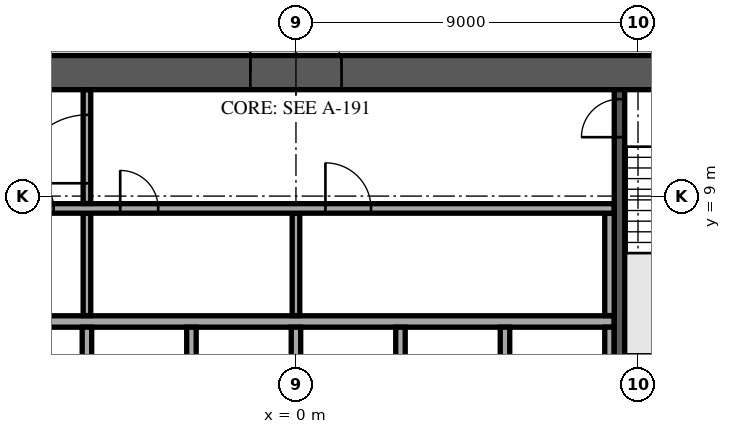
"""IFC4 building model, lengths in metres.
Left out: names, types, materials, properties, quantities, classifications, styles, units other than length and angle.
Written with IfcOpenShell. Run it as: python <this file> out.ifc"""

import sys

from ifc_helpers import new_model, si_unit, direction, frame, frame_2d, origin, place, context, subcontext, project, spatial, rectangle, extrude, element, fill, save


model = new_model("IFC4")
c1 = context("Model", 3, precision=1e-05, world=origin(), true_north=direction((0.0, 1.0)))
c2 = subcontext(c1, "Body", "Model", "MODEL_VIEW")
j1 = project(units=[si_unit("LENGTHUNIT", "METRE"), si_unit("PLANEANGLEUNIT", "RADIAN")], contexts=[c1])
p1 = place(None, origin())
s1 = spatial("IfcSite", under=j1, at=p1, CompositionType="ELEMENT")
p2 = place(p1, origin())
s2 = spatial("IfcBuilding", under=s1, at=p2, CompositionType="ELEMENT")
p3 = place(p2, frame((0.0, 0.0, 205.3)))
s3 = spatial("IfcBuildingStorey", under=s2, at=p3, CompositionType="ELEMENT", Elevation=205.3)
p4 = place(p3, frame((-12.7, 12.25, 0.0), z_axis=(0.0, 0.0, 1.0), x_axis=(1.0, 0.0, 0.0)))
e1 = element("IfcWall", 1, at=p4, inside=s3, PredefinedType="SHEAR", context=c2, shape_type="SweptSolid", body=[
    extrude(rectangle(XDim=25.4, YDim=0.9, at=frame_2d((12.7, 0.0))), origin(), (0.0, 0.0, 1.0), 3.62),
])
p5 = place(p4, frame((11.5, 0.0, 0.0)))
e2 = element("IfcOpeningElement", 2, at=p5, cuts=e1, PredefinedType="OPENING", context=c2, shape_type="SweptSolid", body=[
    extrude(rectangle(XDim=2.4, YDim=2.4, at=frame_2d((1.2, 1.2))), frame((0.0, 0.46, 0.0), z_axis=(0.0, -1.0, 0.0), x_axis=(1.0, 0.0, 0.0)), (0.0, 0.0, 1.0), 0.92),
])
p6 = place(p4, frame((22.325, 0.0, 0.0)))
e3 = element("IfcOpeningElement", 3, at=p6, cuts=e1, PredefinedType="OPENING", context=c2, shape_type="SweptSolid", body=[
    extrude(rectangle(XDim=1.2, YDim=2.1, at=frame_2d((0.6, 1.05))), frame((0.0, 0.46, 0.0), z_axis=(0.0, -1.0, 0.0), x_axis=(1.0, 0.0, 0.0)), (0.0, 0.0, 1.0), 0.92),
])
p7 = place(p4, frame((1.3, 0.0, 0.0)))
e4 = element("IfcOpeningElement", 4, at=p7, cuts=e1, PredefinedType="OPENING", context=c2, shape_type="SweptSolid", body=[
    extrude(rectangle(XDim=1.0, YDim=2.1, at=frame_2d((0.5, 1.05))), frame((0.0, 0.46, 0.0), z_axis=(0.0, -1.0, 0.0), x_axis=(1.0, 0.0, 0.0)), (0.0, 0.0, 1.0), 0.92),
])
p8 = place(p3, frame((-8.375, 5.7, 0.0), z_axis=(0.0, 0.0, 1.0), x_axis=(1.0, 0.0, 0.0)))
e5 = element("IfcWall", 5, at=p8, inside=s3, PredefinedType="SOLIDWALL", context=c2, shape_type="SweptSolid", body=[
    extrude(rectangle(XDim=16.75, YDim=0.3, at=frame_2d((8.375, 0.0))), origin(), (0.0, 0.0, 1.0), 3.62),
])
for number, where, z_axis, x_axis in (
    (6, (-5.5, 2.85, 0.0), (0.0, 0.0, 1.0), (0.0, 1.0, 0.0)),
    (7, (-2.75, 2.85, 0.0), (0.0, 0.0, 1.0), (0.0, 1.0, 0.0)),
    (8, (0.0, 2.85, 0.0), (0.0, 0.0, 1.0), (0.0, 1.0, 0.0)),
    (9, (2.75, 2.85, 0.0), (0.0, 0.0, 1.0), (0.0, 1.0, 0.0)),
    (10, (5.5, 2.85, 0.0), (0.0, 0.0, 1.0), (0.0, 1.0, 0.0)),
    (11, (8.25, 2.85, 0.0), (0.0, 0.0, 1.0), (0.0, 1.0, 0.0)),
):
    element("IfcWall", number, at=place(p3, frame(where, z_axis=z_axis, x_axis=x_axis)), inside=s3, PredefinedType="SOLIDWALL", context=c2, shape_type="SweptSolid", body=[
        extrude(rectangle(XDim=2.7, YDim=0.25, at=frame_2d((1.35, 0.0))), origin(), (0.0, 0.0, 1.0), 3.62),
    ])
p9 = place(p3, frame((8.512, 4.55, 0.0), z_axis=(0.0, 0.0, 1.0), x_axis=(0.0, 1.0, 0.0)))
e12 = element("IfcWall", 12, at=p9, inside=s3, PredefinedType="SOLIDWALL", context=c2, shape_type="SweptSolid", body=[
    extrude(rectangle(XDim=7.25, YDim=0.275, at=frame_2d((3.625, 0.0))), origin(), (0.0, 0.0, 1.0), 3.62),
])
p10 = place(p9, frame((6.0, 0.0, 0.0)))
e13 = element("IfcOpeningElement", 13, at=p10, cuts=e12, PredefinedType="OPENING", context=c2, shape_type="SweptSolid", body=[
    extrude(rectangle(XDim=1.0, YDim=2.1, at=frame_2d((0.5, 1.05))), frame((0.0, 0.147, 0.0), z_axis=(0.0, -1.0, 0.0), x_axis=(1.0, 0.0, 0.0)), (0.0, 0.0, 1.0), 0.295),
])
for number, where, z_axis, x_axis in (
    (14, (-5.5, 5.855, 0.0), (0.0, 0.0, 1.0), (0.0, 1.0, 0.0)),
    (15, (0.0, 5.855, 0.0), (0.0, 0.0, 1.0), (0.0, 1.0, 0.0)),
):
    element("IfcWall", number, at=place(p3, frame(where, z_axis=z_axis, x_axis=x_axis)), inside=s3, PredefinedType="PARTITIONING", context=c2, shape_type="SweptSolid", body=[
        extrude(rectangle(XDim=2.69, YDim=0.2, at=frame_2d((1.345, 0.0))), origin(), (0.0, 0.0, 1.0), 3.62),
    ])
p11 = place(p3, frame((8.25, 5.855, 0.0), z_axis=(0.0, 0.0, 1.0), x_axis=(0.0, 1.0, 0.0)))
e16 = element("IfcWall", 16, at=p11, inside=s3, PredefinedType="PARTITIONING", context=c2, shape_type="SweptSolid", body=[
    extrude(rectangle(XDim=2.69, YDim=0.25, at=frame_2d((1.345, 0.0))), origin(), (0.0, 0.0, 1.0), 3.62),
])
p12 = place(p3, frame((-8.35, 8.675, 0.0), z_axis=(0.0, 0.0, 1.0), x_axis=(1.0, 0.0, 0.0)))
e17 = element("IfcWall", 17, at=p12, inside=s3, PredefinedType="PARTITIONING", context=c2, shape_type="SweptSolid", body=[
    extrude(rectangle(XDim=16.72, YDim=0.25, at=frame_2d((8.36, 0.0))), origin(), (0.0, 0.0, 1.0), 3.62),
])
p13 = place(p12, frame((0.975, 0.0, 0.0)))
e18 = element("IfcOpeningElement", 18, at=p13, cuts=e17, PredefinedType="OPENING", context=c2, shape_type="SweptSolid", body=[
    extrude(rectangle(XDim=1.0, YDim=2.1, at=frame_2d((0.5, 1.05))), frame((0.0, 0.135, 0.0), z_axis=(0.0, -1.0, 0.0), x_axis=(1.0, 0.0, 0.0)), (0.0, 0.0, 1.0), 0.27),
])
p14 = place(p12, frame((3.725, 0.0, 0.0)))
e19 = element("IfcOpeningElement", 19, at=p14, cuts=e17, PredefinedType="OPENING", context=c2, shape_type="SweptSolid", body=[
    extrude(rectangle(XDim=1.0, YDim=2.1, at=frame_2d((0.5, 1.05))), frame((0.0, 0.135, 0.0), z_axis=(0.0, -1.0, 0.0), x_axis=(1.0, 0.0, 0.0)), (0.0, 0.0, 1.0), 0.27),
])
p15 = place(p12, frame((9.125, 0.0, 0.0)))
e20 = element("IfcOpeningElement", 20, at=p15, cuts=e17, PredefinedType="OPENING", context=c2, shape_type="SweptSolid", body=[
    extrude(rectangle(XDim=1.2, YDim=2.1, at=frame_2d((0.6, 1.05))), frame((0.0, 0.135, 0.0), z_axis=(0.0, -1.0, 0.0), x_axis=(1.0, 0.0, 0.0)), (0.0, 0.0, 1.0), 0.27),
])
p16 = place(p3, frame((-5.5, 8.805, 0.0), z_axis=(0.0, 0.0, 1.0), x_axis=(0.0, 1.0, 0.0)))
e21 = element("IfcWall", 21, at=p16, inside=s3, PredefinedType="PARTITIONING", context=c2, shape_type="SweptSolid", body=[
    extrude(rectangle(XDim=2.99, YDim=0.2, at=frame_2d((1.495, 0.0))), origin(), (0.0, 0.0, 1.0), 3.62),
])
p17 = place(p16, frame((0.532, 0.0, 0.0)))
e22 = element("IfcOpeningElement", 22, at=p17, cuts=e21, PredefinedType="OPENING", context=c2, shape_type="SweptSolid", body=[
    extrude(rectangle(XDim=1.8, YDim=2.1, at=frame_2d((0.9, 1.05))), frame((0.0, 0.11, 0.0), z_axis=(0.0, -1.0, 0.0), x_axis=(1.0, 0.0, 0.0)), (0.0, 0.0, 1.0), 0.22),
])
p18 = place(p3, frame((-0.749, 34.782, 0.0), z_axis=(0.0, 0.0, 1.0), x_axis=(-0.694657553534, -0.719340589233, 0.0)))
e23 = element("IfcWall", 23, at=p18, inside=s3, PredefinedType="STANDARD", context=c2, shape_type="SweptSolid", body=[
    extrude(rectangle(XDim=49.0, YDim=0.6, at=frame_2d((24.5, 0.0))), origin(), (0.0, 0.0, 1.0), 3.62),
])
p19 = place(p18, frame((1.227, 0.0, 0.9)))
e24 = element("IfcOpeningElement", 24, at=p19, cuts=e23, PredefinedType="OPENING", context=c2, shape_type="SweptSolid", body=[
    extrude(rectangle(XDim=2.0, YDim=2.1, at=frame_2d((1.0, 1.05))), frame((0.0, 0.31, 0.0), z_axis=(0.0, -1.0, 0.0), x_axis=(1.0, 0.0, 0.0)), (0.0, 0.0, 1.0), 0.62),
])
p20 = place(p18, frame((5.682, 0.0, 0.9)))
e25 = element("IfcOpeningElement", 25, at=p20, cuts=e23, PredefinedType="OPENING", context=c2, shape_type="SweptSolid", body=[
    extrude(rectangle(XDim=2.0, YDim=2.1, at=frame_2d((1.0, 1.05))), frame((0.0, 0.31, 0.0), z_axis=(0.0, -1.0, 0.0), x_axis=(1.0, 0.0, 0.0)), (0.0, 0.0, 1.0), 0.62),
])
p21 = place(p18, frame((10.136, 0.0, 0.9)))
e26 = element("IfcOpeningElement", 26, at=p21, cuts=e23, PredefinedType="OPENING", context=c2, shape_type="SweptSolid", body=[
    extrude(rectangle(XDim=2.0, YDim=2.1, at=frame_2d((1.0, 1.05))), frame((0.0, 0.31, 0.0), z_axis=(0.0, -1.0, 0.0), x_axis=(1.0, 0.0, 0.0)), (0.0, 0.0, 1.0), 0.62),
])
p22 = place(p18, frame((14.591, 0.0, 0.9)))
e27 = element("IfcOpeningElement", 27, at=p22, cuts=e23, PredefinedType="OPENING", context=c2, shape_type="SweptSolid", body=[
    extrude(rectangle(XDim=2.0, YDim=2.1, at=frame_2d((1.0, 1.05))), frame((0.0, 0.31, 0.0), z_axis=(0.0, -1.0, 0.0), x_axis=(1.0, 0.0, 0.0)), (0.0, 0.0, 1.0), 0.62),
])
p23 = place(p18, frame((19.045, 0.0, 0.9)))
e28 = element("IfcOpeningElement", 28, at=p23, cuts=e23, PredefinedType="OPENING", context=c2, shape_type="SweptSolid", body=[
    extrude(rectangle(XDim=2.0, YDim=2.1, at=frame_2d((1.0, 1.05))), frame((0.0, 0.31, 0.0), z_axis=(0.0, -1.0, 0.0), x_axis=(1.0, 0.0, 0.0)), (0.0, 0.0, 1.0), 0.62),
])
p24 = place(p18, frame((23.5, 0.0, 0.9)))
e29 = element("IfcOpeningElement", 29, at=p24, cuts=e23, PredefinedType="OPENING", context=c2, shape_type="SweptSolid", body=[
    extrude(rectangle(XDim=2.0, YDim=2.1, at=frame_2d((1.0, 1.05))), frame((0.0, 0.31, 0.0), z_axis=(0.0, -1.0, 0.0), x_axis=(1.0, 0.0, 0.0)), (0.0, 0.0, 1.0), 0.62),
])
p25 = place(p18, frame((27.955, 0.0, 0.9)))
e30 = element("IfcOpeningElement", 30, at=p25, cuts=e23, PredefinedType="OPENING", context=c2, shape_type="SweptSolid", body=[
    extrude(rectangle(XDim=2.0, YDim=2.1, at=frame_2d((1.0, 1.05))), frame((0.0, 0.31, 0.0), z_axis=(0.0, -1.0, 0.0), x_axis=(1.0, 0.0, 0.0)), (0.0, 0.0, 1.0), 0.62),
])
p26 = place(p18, frame((32.409, 0.0, 0.9)))
e31 = element("IfcOpeningElement", 31, at=p26, cuts=e23, PredefinedType="OPENING", context=c2, shape_type="SweptSolid", body=[
    extrude(rectangle(XDim=2.0, YDim=2.1, at=frame_2d((1.0, 1.05))), frame((0.0, 0.31, 0.0), z_axis=(0.0, -1.0, 0.0), x_axis=(1.0, 0.0, 0.0)), (0.0, 0.0, 1.0), 0.62),
])
p27 = place(p18, frame((36.864, 0.0, 0.9)))
e32 = element("IfcOpeningElement", 32, at=p27, cuts=e23, PredefinedType="OPENING", context=c2, shape_type="SweptSolid", body=[
    extrude(rectangle(XDim=2.0, YDim=2.1, at=frame_2d((1.0, 1.05))), frame((0.0, 0.31, 0.0), z_axis=(0.0, -1.0, 0.0), x_axis=(1.0, 0.0, 0.0)), (0.0, 0.0, 1.0), 0.62),
])
p28 = place(p18, frame((41.318, 0.0, 0.9)))
e33 = element("IfcOpeningElement", 33, at=p28, cuts=e23, PredefinedType="OPENING", context=c2, shape_type="SweptSolid", body=[
    extrude(rectangle(XDim=2.0, YDim=2.1, at=frame_2d((1.0, 1.05))), frame((0.0, 0.31, 0.0), z_axis=(0.0, -1.0, 0.0), x_axis=(1.0, 0.0, 0.0)), (0.0, 0.0, 1.0), 0.62),
])
p29 = place(p18, frame((45.773, 0.0, 0.9)))
e34 = element("IfcOpeningElement", 34, at=p29, cuts=e23, PredefinedType="OPENING", context=c2, shape_type="SweptSolid", body=[
    extrude(rectangle(XDim=2.0, YDim=2.1, at=frame_2d((1.0, 1.05))), frame((0.0, 0.31, 0.0), z_axis=(0.0, -1.0, 0.0), x_axis=(1.0, 0.0, 0.0)), (0.0, 0.0, 1.0), 0.62),
])
p30 = place(p3, frame((34.658, 7.819, 0.0), z_axis=(0.0, 0.0, 1.0), x_axis=(-0.719340729741, 0.694657408034, 0.0)))
e35 = element("IfcWall", 35, at=p30, inside=s3, PredefinedType="STANDARD", context=c2, shape_type="SweptSolid", body=[
    extrude(rectangle(XDim=39.0, YDim=0.6, at=frame_2d((19.5, 0.0))), origin(), (0.0, 0.0, 1.0), 3.62),
])
p31 = place(p30, frame((1.217, 0.0, 0.9)))
e36 = element("IfcOpeningElement", 36, at=p31, cuts=e35, PredefinedType="OPENING", context=c2, shape_type="SweptSolid", body=[
    extrude(rectangle(XDim=1.9, YDim=2.1, at=frame_2d((0.95, 1.05))), frame((0.0, 0.31, 0.0), z_axis=(0.0, -1.0, 0.0), x_axis=(1.0, 0.0, 0.0)), (0.0, 0.0, 1.0), 0.62),
])
p32 = place(p30, frame((5.55, 0.0, 0.9)))
e37 = element("IfcOpeningElement", 37, at=p32, cuts=e35, PredefinedType="OPENING", context=c2, shape_type="SweptSolid", body=[
    extrude(rectangle(XDim=1.9, YDim=2.1, at=frame_2d((0.95, 1.05))), frame((0.0, 0.31, 0.0), z_axis=(0.0, -1.0, 0.0), x_axis=(1.0, 0.0, 0.0)), (0.0, 0.0, 1.0), 0.62),
])
p33 = place(p30, frame((9.883, 0.0, 0.9)))
e38 = element("IfcOpeningElement", 38, at=p33, cuts=e35, PredefinedType="OPENING", context=c2, shape_type="SweptSolid", body=[
    extrude(rectangle(XDim=1.9, YDim=2.1, at=frame_2d((0.95, 1.05))), frame((0.0, 0.31, 0.0), z_axis=(0.0, -1.0, 0.0), x_axis=(1.0, 0.0, 0.0)), (0.0, 0.0, 1.0), 0.62),
])
p34 = place(p30, frame((14.217, 0.0, 0.9)))
e39 = element("IfcOpeningElement", 39, at=p34, cuts=e35, PredefinedType="OPENING", context=c2, shape_type="SweptSolid", body=[
    extrude(rectangle(XDim=1.9, YDim=2.1, at=frame_2d((0.95, 1.05))), frame((0.0, 0.31, 0.0), z_axis=(0.0, -1.0, 0.0), x_axis=(1.0, 0.0, 0.0)), (0.0, 0.0, 1.0), 0.62),
])
p35 = place(p30, frame((18.55, 0.0, 0.9)))
e40 = element("IfcOpeningElement", 40, at=p35, cuts=e35, PredefinedType="OPENING", context=c2, shape_type="SweptSolid", body=[
    extrude(rectangle(XDim=1.9, YDim=2.1, at=frame_2d((0.95, 1.05))), frame((0.0, 0.31, 0.0), z_axis=(0.0, -1.0, 0.0), x_axis=(1.0, 0.0, 0.0)), (0.0, 0.0, 1.0), 0.62),
])
p36 = place(p30, frame((22.883, 0.0, 0.9)))
e41 = element("IfcOpeningElement", 41, at=p36, cuts=e35, PredefinedType="OPENING", context=c2, shape_type="SweptSolid", body=[
    extrude(rectangle(XDim=1.9, YDim=2.1, at=frame_2d((0.95, 1.05))), frame((0.0, 0.31, 0.0), z_axis=(0.0, -1.0, 0.0), x_axis=(1.0, 0.0, 0.0)), (0.0, 0.0, 1.0), 0.62),
])
p37 = place(p30, frame((27.217, 0.0, 0.9)))
e42 = element("IfcOpeningElement", 42, at=p37, cuts=e35, PredefinedType="OPENING", context=c2, shape_type="SweptSolid", body=[
    extrude(rectangle(XDim=1.9, YDim=2.1, at=frame_2d((0.95, 1.05))), frame((0.0, 0.31, 0.0), z_axis=(0.0, -1.0, 0.0), x_axis=(1.0, 0.0, 0.0)), (0.0, 0.0, 1.0), 0.62),
])
p38 = place(p30, frame((31.55, 0.0, 0.9)))
e43 = element("IfcOpeningElement", 43, at=p38, cuts=e35, PredefinedType="OPENING", context=c2, shape_type="SweptSolid", body=[
    extrude(rectangle(XDim=1.9, YDim=2.1, at=frame_2d((0.95, 1.05))), frame((0.0, 0.31, 0.0), z_axis=(0.0, -1.0, 0.0), x_axis=(1.0, 0.0, 0.0)), (0.0, 0.0, 1.0), 0.62),
])
p39 = place(p30, frame((35.883, 0.0, 0.9)))
e44 = element("IfcOpeningElement", 44, at=p39, cuts=e35, PredefinedType="OPENING", context=c2, shape_type="SweptSolid", body=[
    extrude(rectangle(XDim=1.9, YDim=2.1, at=frame_2d((0.95, 1.05))), frame((0.0, 0.31, 0.0), z_axis=(0.0, -1.0, 0.0), x_axis=(1.0, 0.0, 0.0)), (0.0, 0.0, 1.0), 0.62),
])
p40 = place(p3, frame((-26.96, -0.016, 0.0), z_axis=(0.0, 0.0, 1.0), x_axis=(0.694654845656, 0.719343204184, 0.0)))
e45 = element("IfcWall", 45, at=p40, inside=s3, PredefinedType="PARTITIONING", context=c2, shape_type="SweptSolid", body=[
    extrude(rectangle(XDim=37.479, YDim=0.15, at=frame_2d((18.74, 0.0))), origin(), (0.0, 0.0, 1.0), 2.97),
])
p41 = place(p40, frame((4.3, 0.0, 0.0)))
e46 = element("IfcOpeningElement", 46, at=p41, cuts=e45, PredefinedType="OPENING", context=c2, shape_type="SweptSolid", body=[
    extrude(rectangle(XDim=1.8, YDim=2.1, at=frame_2d((0.9, 1.05))), frame((0.0, 0.085, 0.0), z_axis=(0.0, -1.0, 0.0), x_axis=(1.0, 0.0, 0.0)), (0.0, 0.0, 1.0), 0.17),
])
p42 = place(p40, frame((15.547, 0.0, 0.0)))
e47 = element("IfcOpeningElement", 47, at=p42, cuts=e45, PredefinedType="OPENING", context=c2, shape_type="SweptSolid", body=[
    extrude(rectangle(XDim=1.0, YDim=2.1, at=frame_2d((0.5, 1.05))), frame((0.0, 0.085, 0.0), z_axis=(0.0, -1.0, 0.0), x_axis=(1.0, 0.0, 0.0)), (0.0, 0.0, 1.0), 0.17),
])
p43 = place(p40, frame((22.58, 0.0, 0.0)))
e48 = element("IfcOpeningElement", 48, at=p43, cuts=e45, PredefinedType="OPENING", context=c2, shape_type="SweptSolid", body=[
    extrude(rectangle(XDim=1.0, YDim=2.1, at=frame_2d((0.5, 1.05))), frame((0.0, 0.085, 0.0), z_axis=(0.0, -1.0, 0.0), x_axis=(1.0, 0.0, 0.0)), (0.0, 0.0, 1.0), 0.17),
])
p44 = place(p40, frame((35.508, 0.0, 0.0)))
e49 = element("IfcOpeningElement", 49, at=p44, cuts=e45, PredefinedType="OPENING", context=c2, shape_type="SweptSolid", body=[
    extrude(rectangle(XDim=1.0, YDim=2.1, at=frame_2d((0.5, 1.05))), frame((0.0, 0.085, 0.0), z_axis=(0.0, -1.0, 0.0), x_axis=(1.0, 0.0, 0.0)), (0.0, 0.0, 1.0), 0.17),
])
p45 = place(p3, frame((5.597, 25.362, 0.0), z_axis=(0.0, 0.0, 1.0), x_axis=(0.719350067003, -0.69464773886, 0.0)))
e50 = element("IfcWall", 50, at=p45, inside=s3, PredefinedType="PARTITIONING", context=c2, shape_type="SweptSolid", body=[
    extrude(rectangle(XDim=27.258, YDim=0.15, at=frame_2d((13.629, 0.0))), origin(), (0.0, 0.0, 1.0), 3.17),
])
p46 = place(p45, frame((11.017, 0.0, 0.0)))
e51 = element("IfcOpeningElement", 51, at=p46, cuts=e50, PredefinedType="OPENING", context=c2, shape_type="SweptSolid", body=[
    extrude(rectangle(XDim=1.0, YDim=2.1, at=frame_2d((0.5, 1.05))), frame((0.0, 0.085, 0.0), z_axis=(0.0, -1.0, 0.0), x_axis=(1.0, 0.0, 0.0)), (0.0, 0.0, 1.0), 0.17),
])
p47 = place(p45, frame((16.287, 0.0, 0.0)))
e52 = element("IfcOpeningElement", 52, at=p47, cuts=e50, PredefinedType="OPENING", context=c2, shape_type="SweptSolid", body=[
    extrude(rectangle(XDim=1.0, YDim=2.1, at=frame_2d((0.5, 1.05))), frame((0.0, 0.085, 0.0), z_axis=(0.0, -1.0, 0.0), x_axis=(1.0, 0.0, 0.0)), (0.0, 0.0, 1.0), 0.17),
])
p48 = place(p45, frame((24.435, 0.0, 0.0)))
e53 = element("IfcOpeningElement", 53, at=p48, cuts=e50, PredefinedType="OPENING", context=c2, shape_type="SweptSolid", body=[
    extrude(rectangle(XDim=1.8, YDim=2.1, at=frame_2d((0.9, 1.05))), frame((0.0, 0.085, 0.0), z_axis=(0.0, -1.0, 0.0), x_axis=(1.0, 0.0, 0.0)), (0.0, 0.0, 1.0), 0.17),
])
p49 = place(p5, origin())
e54 = element("IfcDoor", 54, at=p49, inside=s3, OperationType="SINGLE_SWING_LEFT", PredefinedType="DOOR", context=c2, shape_type="SweptSolid", body=[
    extrude(rectangle(XDim=2.4, YDim=2.4, at=frame_2d((1.2, 1.2))), frame((0.0, 0.025, 0.0), z_axis=(0.0, -1.0, 0.0), x_axis=(1.0, 0.0, 0.0)), (0.0, 0.0, 1.0), 0.05),
])
fill(e2, e54)
p50 = place(p10, origin())
e55 = element("IfcDoor", 55, at=p50, inside=s3, OperationType="SINGLE_SWING_LEFT", PredefinedType="DOOR", context=c2, shape_type="SweptSolid", body=[
    extrude(rectangle(XDim=1.0, YDim=2.1, at=frame_2d((0.5, 1.05))), frame((0.0, 0.025, 0.0), z_axis=(0.0, -1.0, 0.0), x_axis=(1.0, 0.0, 0.0)), (0.0, 0.0, 1.0), 0.05),
])
fill(e13, e55)
p51 = place(p13, origin())
e56 = element("IfcDoor", 56, at=p51, inside=s3, OperationType="SINGLE_SWING_LEFT", PredefinedType="DOOR", context=c2, shape_type="SweptSolid", body=[
    extrude(rectangle(XDim=1.0, YDim=2.1, at=frame_2d((0.5, 1.05))), frame((0.0, 0.025, 0.0), z_axis=(0.0, -1.0, 0.0), x_axis=(1.0, 0.0, 0.0)), (0.0, 0.0, 1.0), 0.05),
])
fill(e18, e56)
p52 = place(p14, origin())
e57 = element("IfcDoor", 57, at=p52, inside=s3, OperationType="SINGLE_SWING_LEFT", PredefinedType="DOOR", context=c2, shape_type="SweptSolid", body=[
    extrude(rectangle(XDim=1.0, YDim=2.1, at=frame_2d((0.5, 1.05))), frame((0.0, 0.025, 0.0), z_axis=(0.0, -1.0, 0.0), x_axis=(1.0, 0.0, 0.0)), (0.0, 0.0, 1.0), 0.05),
])
fill(e19, e57)
p53 = place(p15, origin())
e58 = element("IfcDoor", 58, at=p53, inside=s3, OperationType="SINGLE_SWING_LEFT", PredefinedType="DOOR", context=c2, shape_type="SweptSolid", body=[
    extrude(rectangle(XDim=1.2, YDim=2.1, at=frame_2d((0.6, 1.05))), frame((0.0, 0.025, 0.0), z_axis=(0.0, -1.0, 0.0), x_axis=(1.0, 0.0, 0.0)), (0.0, 0.0, 1.0), 0.05),
])
fill(e20, e58)
p54 = place(p17, origin())
e59 = element("IfcDoor", 59, at=p54, inside=s3, OperationType="SINGLE_SWING_LEFT", PredefinedType="DOOR", context=c2, shape_type="SweptSolid", body=[
    extrude(rectangle(XDim=1.8, YDim=2.1, at=frame_2d((0.9, 1.05))), frame((0.0, 0.025, 0.0), z_axis=(0.0, -1.0, 0.0), x_axis=(1.0, 0.0, 0.0)), (0.0, 0.0, 1.0), 0.05),
])
fill(e22, e59)
save(model, sys.argv[1])
